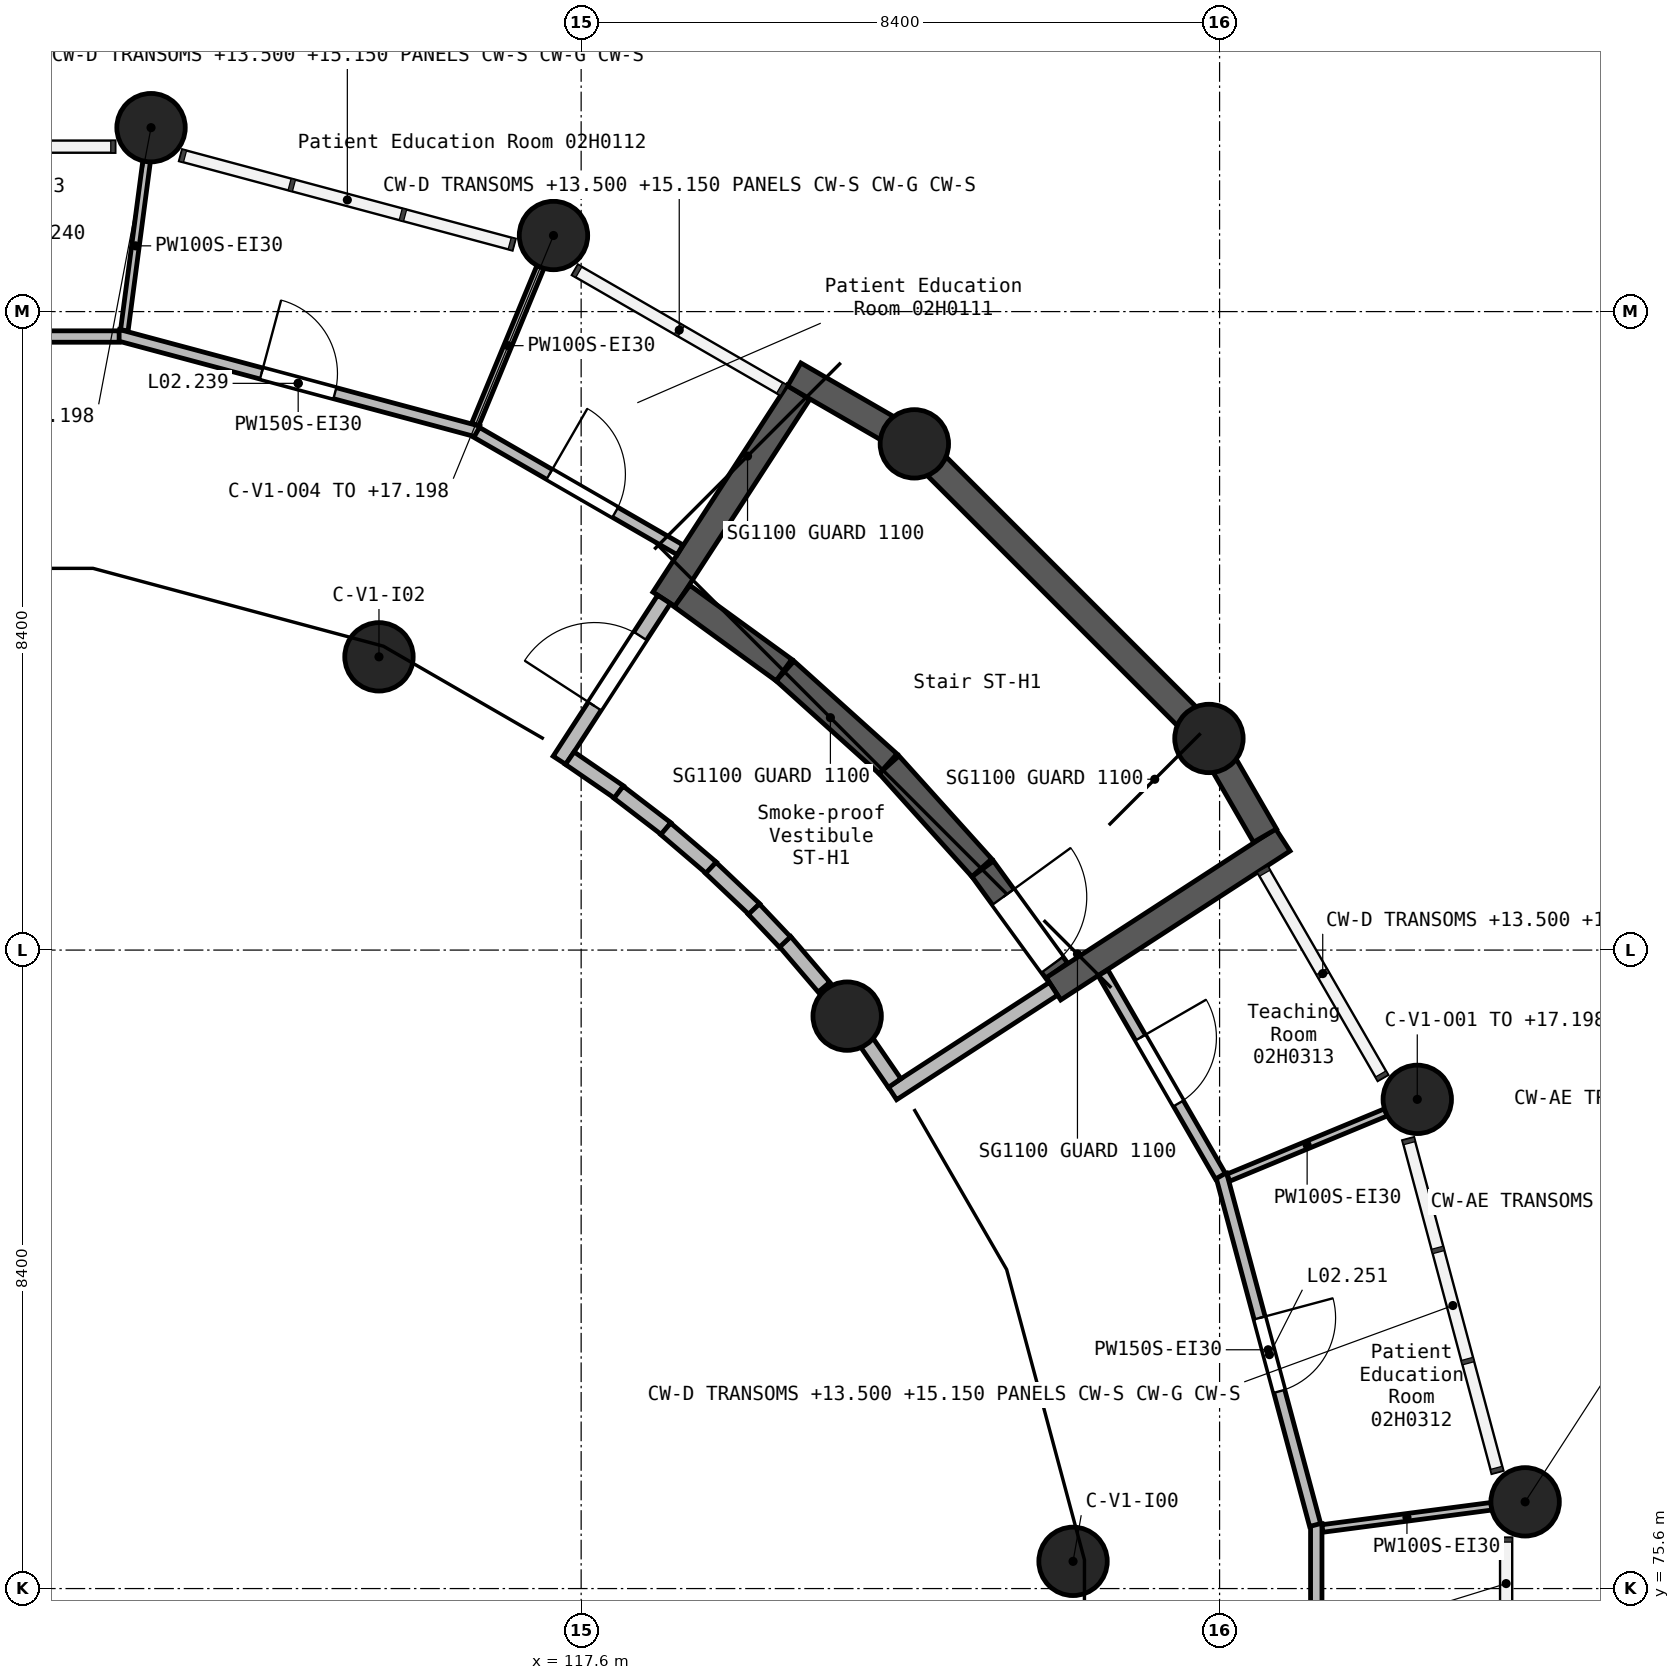
"""IFC4 building model, lengths in metres.
Left out: names, types, materials, properties, quantities, classifications, styles, units other than length and angle.
Written with IfcOpenShell. Run it as: python <this file> out.ifc"""

import sys

from ifc_helpers import new_model, si_unit, direction, frame, frame_2d, origin, origin_2d, place, context, subcontext, project, spatial, rectangle, circle, extrude, element, fill, save


model = new_model("IFC4")
c1 = context("Model", 3, precision=1e-05, world=origin(), true_north=direction((0.0, 1.0)))
c2 = subcontext(c1, "Body", "Model", "MODEL_VIEW")
j1 = project(units=[si_unit("LENGTHUNIT", "METRE"), si_unit("PLANEANGLEUNIT", "RADIAN")], contexts=[c1])
p1 = place(None, origin())
s1 = spatial("IfcSite", under=j1, at=p1, CompositionType="ELEMENT")
p2 = place(p1, origin())
s2 = spatial("IfcBuilding", under=s1, at=p2, CompositionType="ELEMENT")
p3 = place(p2, frame((0.0, 0.0, 12.6)))
s3 = spatial("IfcBuildingStorey", under=s2, at=p3, CompositionType="ELEMENT", Elevation=12.6)
p4 = place(p3, frame((111.941, 94.82, 0.0), z_axis=(0.0, 0.0, 1.0), x_axis=(1.0, 0.0, 0.0)))
e1 = element("IfcColumn", 1, at=p4, inside=s3, PredefinedType="COLUMN", context=c2, shape_type="SweptSolid", body=[
    extrude(circle(Radius=0.45, at=origin_2d()), origin(), (0.0, 0.0, 1.0), 4.598),
])
p5 = place(p3, frame((114.94, 87.858, 0.0), z_axis=(0.0, 0.0, 1.0), x_axis=(1.0, 0.0, 0.0)))
e2 = element("IfcColumn", 2, at=p5, inside=s3, PredefinedType="COLUMN", context=c2, shape_type="SweptSolid", body=[
    extrude(circle(Radius=0.45, at=origin_2d()), origin(), (0.0, 0.0, 1.0), 4.2),
])
p6 = place(p3, frame((117.236, 93.401, 0.0), z_axis=(0.0, 0.0, 1.0), x_axis=(1.0, 0.0, 0.0)))
e3 = element("IfcColumn", 3, at=p6, inside=s3, PredefinedType="COLUMN", context=c2, shape_type="SweptSolid", body=[
    extrude(circle(Radius=0.45, at=origin_2d()), origin(), (0.0, 0.0, 1.0), 4.598),
])
p7 = place(p3, frame((121.1, 83.131, 0.0), z_axis=(0.0, 0.0, 1.0), x_axis=(1.0, 0.0, 0.0)))
e4 = element("IfcColumn", 4, at=p7, inside=s3, PredefinedType="COLUMN", context=c2, shape_type="SweptSolid", body=[
    extrude(circle(Radius=0.45, at=origin_2d()), origin(), (0.0, 0.0, 1.0), 4.2),
])
p8 = place(p3, frame((121.984, 90.66, 0.0), z_axis=(0.0, 0.0, 1.0), x_axis=(1.0, 0.0, 0.0)))
e5 = element("IfcColumn", 5, at=p8, inside=s3, PredefinedType="COLUMN", context=c2, shape_type="SweptSolid", body=[
    extrude(circle(Radius=0.45, at=origin_2d()), origin(), (0.0, 0.0, 1.0), 4.598),
])
p9 = place(p3, frame((124.072, 75.958, 0.0), z_axis=(0.0, 0.0, 1.0), x_axis=(1.0, 0.0, 0.0)))
e6 = element("IfcColumn", 6, at=p9, inside=s3, PredefinedType="COLUMN", context=c2, shape_type="SweptSolid", body=[
    extrude(circle(Radius=0.45, at=origin_2d()), origin(), (0.0, 0.0, 1.0), 4.2),
])
for number, where, z_axis, x_axis in (
    (7, (125.86, 86.784, 0.0), (0.0, 0.0, 1.0), (1.0, 0.0, 0.0)),
    (8, (128.601, 82.036, 0.0), (0.0, 0.0, 1.0), (1.0, 0.0, 0.0)),
    (9, (130.02, 76.741, 0.0), (0.0, 0.0, 1.0), (1.0, 0.0, 0.0)),
):
    element("IfcColumn", number, at=place(p3, frame(where, z_axis=z_axis, x_axis=x_axis)), inside=s3, PredefinedType="COLUMN", context=c2, shape_type="SweptSolid", body=[
        extrude(circle(Radius=0.45, at=origin_2d()), origin(), (0.0, 0.0, 1.0), 4.598),
    ])
p10 = place(p3, frame((118.691, 88.614, 0.0), z_axis=(0.0, 0.0, 1.0), x_axis=(0.544668615038, 0.838651357712, 0.0)))
e10 = element("IfcWall", 10, at=p10, inside=s3, PredefinedType="SHEAR", context=c2, shape_type="SweptSolid", body=[
    extrude(rectangle(XDim=3.248, YDim=0.35, at=frame_2d((1.624, 0.0))), origin(), (0.0, 0.0, 1.0), 4.2),
])
p11 = place(p3, frame((118.927, 88.658, 0.0), z_axis=(0.0, 0.0, 1.0), x_axis=(0.808869786542, -0.587987813155, 0.0)))
e11 = element("IfcWall", 11, at=p11, inside=s3, PredefinedType="SHEAR", context=c2, shape_type="SweptSolid", body=[
    extrude(rectangle(XDim=1.658, YDim=0.35, at=frame_2d((0.829, 0.0))), origin(), (0.0, 0.0, 1.0), 4.2),
])
p12 = place(p3, frame((120.283, 87.672, 0.0), z_axis=(0.0, 0.0, 1.0), x_axis=(0.743081147279, -0.669201321397, 0.0)))
e12 = element("IfcWall", 12, at=p12, inside=s3, PredefinedType="SHEAR", context=c2, shape_type="SweptSolid", body=[
    extrude(rectangle(XDim=1.824, YDim=0.35, at=frame_2d((0.912, 0.0))), origin(), (0.0, 0.0, 1.0), 4.2),
])
p13 = place(p3, frame((120.404, 91.573, 0.0), z_axis=(0.0, 0.0, 1.0), x_axis=(0.866050214951, -0.499957023337, 0.0)))
e13 = element("IfcWall", 13, at=p13, inside=s3, PredefinedType="SHEAR", context=c2, shape_type="SweptSolid", body=[
    extrude(rectangle(XDim=1.802, YDim=0.35, at=frame_2d((0.901, 0.0))), origin(), (0.0, 0.0, 1.0), 4.2),
])
p14 = place(p3, frame((121.651, 86.438, 0.0), z_axis=(0.0, 0.0, 1.0), x_axis=(0.669201321397, -0.743081147279, 0.0)))
e14 = element("IfcWall", 14, at=p14, inside=s3, PredefinedType="SHEAR", context=c2, shape_type="SweptSolid", body=[
    extrude(rectangle(XDim=1.824, YDim=0.35, at=frame_2d((0.912, 0.0))), origin(), (0.0, 0.0, 1.0), 4.2),
])
p15 = place(p3, frame((122.0, 90.644, 0.0), z_axis=(0.0, 0.0, 1.0), x_axis=(0.707106781187, -0.707106781187, 0.0)))
e15 = element("IfcWall", 15, at=p15, inside=s3, PredefinedType="SHEAR", context=c2, shape_type="SweptSolid", body=[
    extrude(rectangle(XDim=5.436, YDim=0.35, at=frame_2d((2.718, 0.0))), origin(), (0.0, 0.0, 1.0), 4.2),
])
p16 = place(p3, frame((122.883, 85.069, 0.0), z_axis=(0.0, 0.0, 1.0), x_axis=(0.587987813155, -0.808869786542, 0.0)))
e16 = element("IfcWall", 16, at=p16, inside=s3, PredefinedType="SHEAR", context=c2, shape_type="SweptSolid", body=[
    extrude(rectangle(XDim=1.658, YDim=0.35, at=frame_2d((0.829, 0.0))), origin(), (0.0, 0.0, 1.0), 4.2),
])
p17 = place(p16, frame((0.458, 0.0, 0.0)))
e17 = element("IfcOpeningElement", 17, at=p17, cuts=e16, PredefinedType="OPENING", context=c2, shape_type="SweptSolid", body=[
    extrude(rectangle(XDim=1.1, YDim=2.1, at=frame_2d((0.55, 1.05))), frame((0.0, 0.185, 0.0), z_axis=(0.0, -1.0, 0.0), x_axis=(1.0, 0.0, 0.0)), (0.0, 0.0, 1.0), 0.37),
])
p18 = place(p3, frame((123.814, 83.491, 0.0), z_axis=(0.0, 0.0, 1.0), x_axis=(0.838691576971, 0.544606682587, 0.0)))
e18 = element("IfcWall", 18, at=p18, inside=s3, PredefinedType="SHEAR", context=c2, shape_type="SweptSolid", body=[
    extrude(rectangle(XDim=3.598, YDim=0.35, at=frame_2d((1.799, 0.0))), origin(), (0.0, 0.0, 1.0), 4.2),
])
p19 = place(p3, frame((125.872, 86.764, 0.0), z_axis=(0.0, 0.0, 1.0), x_axis=(0.499882561262, -0.866093196455, 0.0)))
e19 = element("IfcWall", 19, at=p19, inside=s3, PredefinedType="SHEAR", context=c2, shape_type="SweptSolid", body=[
    extrude(rectangle(XDim=1.452, YDim=0.35, at=frame_2d((0.726, 0.0))), origin(), (0.0, 0.0, 1.0), 4.2),
])
p20 = place(p3, frame((117.315, 86.496, 0.0), z_axis=(0.0, 0.0, 1.0), x_axis=(0.544553338247, 0.838726213853, 0.0)))
e20 = element("IfcWall", 20, at=p20, inside=s3, PredefinedType="SOLIDWALL", context=c2, shape_type="SweptSolid", body=[
    extrude(rectangle(XDim=2.525, YDim=0.2, at=frame_2d((1.263, 0.0))), origin(), (0.0, 0.0, 1.0), 3.85),
])
p21 = place(p20, frame((0.85, 0.0, 0.0)))
e21 = element("IfcOpeningElement", 21, at=p21, cuts=e20, PredefinedType="OPENING", context=c2, shape_type="SweptSolid", body=[
    extrude(rectangle(XDim=1.1, YDim=2.1, at=frame_2d((0.55, 1.05))), frame((0.0, 0.11, 0.0), z_axis=(0.0, -1.0, 0.0), x_axis=(1.0, 0.0, 0.0)), (0.0, 0.0, 1.0), 0.22),
])
p22 = place(p3, frame((121.696, 82.115, 0.0), z_axis=(0.0, 0.0, 1.0), x_axis=(0.838726213853, 0.544553338247, 0.0)))
e22 = element("IfcWall", 22, at=p22, inside=s3, PredefinedType="SOLIDWALL", context=c2, shape_type="SweptSolid", body=[
    extrude(rectangle(XDim=2.525, YDim=0.2, at=frame_2d((1.263, 0.0))), origin(), (0.0, 0.0, 1.0), 3.85),
])
p23 = place(p3, frame((121.335, 82.817, 0.0), z_axis=(0.0, 0.0, 1.0), x_axis=(0.56675458302, -0.823886668557, 0.0)))
e23 = element("IfcWall", 23, at=p23, inside=s3, PredefinedType="SOLIDWALL", context=c2, shape_type="SweptSolid", body=[
    extrude(rectangle(XDim=0.688, YDim=0.2, at=frame_2d((0.344, 0.0))), origin(), (0.0, 0.0, 1.0), 3.85),
])
p24 = place(p3, frame((117.45, 86.525, 0.0), z_axis=(0.0, 0.0, 1.0), x_axis=(0.823906287356, -0.566726062269, 0.0)))
e24 = element("IfcWall", 24, at=p24, inside=s3, PredefinedType="SOLIDWALL", context=c2, shape_type="SweptSolid", body=[
    extrude(rectangle(XDim=0.788, YDim=0.2, at=frame_2d((0.394, 0.0))), origin(), (0.0, 0.0, 1.0), 3.85),
])
for number, where, z_axis, x_axis in (
    (25, (118.092, 86.077, 0.0), (0.0, 0.0, 1.0), (0.793, -0.609, 0.0)),
    (26, (120.282, 84.113, 0.0), (0.0, 0.0, 1.0), (0.65, -0.76, 0.0)),
):
    element("IfcWall", number, at=place(p3, frame(where, z_axis=z_axis, x_axis=x_axis)), inside=s3, PredefinedType="SOLIDWALL", context=c2, shape_type="SweptSolid", body=[
        extrude(rectangle(XDim=0.79, YDim=0.2, at=frame_2d((0.395, 0.0))), origin(), (0.0, 0.0, 1.0), 3.85),
    ])
p25 = place(p3, frame((118.712, 85.595, 0.0), z_axis=(0.0, 0.0, 1.0), x_axis=(0.760389572583, -0.649467241597, 0.0)))
e27 = element("IfcWall", 27, at=p25, inside=s3, PredefinedType="SOLIDWALL", context=c2, shape_type="SweptSolid", body=[
    extrude(rectangle(XDim=0.79, YDim=0.2, at=frame_2d((0.395, 0.0))), origin(), (0.0, 0.0, 1.0), 3.85),
])
p26 = place(p3, frame((119.306, 85.082, 0.0), z_axis=(0.0, 0.0, 1.0), x_axis=(0.726001390363, -0.687693231893, 0.0)))
e28 = element("IfcWall", 28, at=p26, inside=s3, PredefinedType="SOLIDWALL", context=c2, shape_type="SweptSolid", body=[
    extrude(rectangle(XDim=0.79, YDim=0.2, at=frame_2d((0.395, 0.0))), origin(), (0.0, 0.0, 1.0), 3.85),
])
p27 = place(p3, frame((119.872, 84.538, 0.0), z_axis=(0.0, 0.0, 1.0), x_axis=(0.687562563481, -0.726125141624, 0.0)))
e29 = element("IfcWall", 29, at=p27, inside=s3, PredefinedType="SOLIDWALL", context=c2, shape_type="SweptSolid", body=[
    extrude(rectangle(XDim=0.595, YDim=0.2, at=frame_2d((0.298, 0.0))), origin(), (0.0, 0.0, 1.0), 3.85),
])
p28 = place(p3, frame((127.272, 71.545, 0.0), z_axis=(0.0, 0.0, 1.0), x_axis=(0.0, 1.0, 0.0)))
e30 = element("IfcWall", 30, at=p28, inside=s3, PredefinedType="PARTITIONING", context=c2, shape_type="SweptSolid", body=[
    extrude(rectangle(XDim=4.91, YDim=0.15, at=frame_2d((2.455, 0.0))), origin(), (0.0, 0.0, 1.0), 3.85),
])
p29 = place(p28, frame((1.955, 0.0, 0.0)))
e31 = element("IfcOpeningElement", 31, at=p29, cuts=e30, PredefinedType="OPENING", context=c2, shape_type="SweptSolid", body=[
    extrude(rectangle(XDim=1.0, YDim=2.1, at=frame_2d((0.5, 1.05))), frame((0.0, 0.085, 0.0), z_axis=(0.0, -1.0, 0.0), x_axis=(1.0, 0.0, 0.0)), (0.0, 0.0, 1.0), 0.17),
])
p30 = place(p3, frame((111.507, 92.091, 0.0), z_axis=(0.0, 0.0, 1.0), x_axis=(0.965901416029, -0.258910128254, 0.0)))
e32 = element("IfcWall", 32, at=p30, inside=s3, PredefinedType="PARTITIONING", context=c2, shape_type="SweptSolid", body=[
    extrude(rectangle(XDim=4.908, YDim=0.15, at=frame_2d((2.454, 0.0))), origin(), (0.0, 0.0, 1.0), 3.85),
])
p31 = place(p30, frame((1.954, 0.0, 0.0)))
e33 = element("IfcOpeningElement", 33, at=p31, cuts=e32, PredefinedType="OPENING", context=c2, shape_type="SweptSolid", body=[
    extrude(rectangle(XDim=1.0, YDim=2.1, at=frame_2d((0.5, 1.05))), frame((0.0, 0.085, 0.0), z_axis=(0.0, -1.0, 0.0), x_axis=(1.0, 0.0, 0.0)), (0.0, 0.0, 1.0), 0.17),
])
p32 = place(p3, frame((106.879, 92.072, 0.0), z_axis=(0.0, 0.0, 1.0), x_axis=(1.0, 0.0, 0.0)))
e34 = element("IfcWall", 34, at=p32, inside=s3, PredefinedType="PARTITIONING", context=c2, shape_type="SweptSolid", body=[
    extrude(rectangle(XDim=4.642, YDim=0.15, at=frame_2d((2.321, 0.0))), origin(), (0.0, 0.0, 1.0), 3.85),
])
p33 = place(p32, frame((1.821, 0.0, 0.0)))
e35 = element("IfcOpeningElement", 35, at=p33, cuts=e34, PredefinedType="OPENING", context=c2, shape_type="SweptSolid", body=[
    extrude(rectangle(XDim=1.0, YDim=2.1, at=frame_2d((0.5, 1.05))), frame((0.0, 0.085, 0.0), z_axis=(0.0, -1.0, 0.0), x_axis=(1.0, 0.0, 0.0)), (0.0, 0.0, 1.0), 0.17),
])
p34 = place(p3, frame((126.021, 81.047, 0.0), z_axis=(0.0, 0.0, 1.0), x_axis=(0.259008724248, -0.965874981953, 0.0)))
e36 = element("IfcWall", 36, at=p34, inside=s3, PredefinedType="PARTITIONING", context=c2, shape_type="SweptSolid", body=[
    extrude(rectangle(XDim=4.774, YDim=0.15, at=frame_2d((2.387, 0.0))), origin(), (0.0, 0.0, 1.0), 3.85),
])
p35 = place(p34, frame((1.954, 0.0, 0.0)))
e37 = element("IfcOpeningElement", 37, at=p35, cuts=e36, PredefinedType="OPENING", context=c2, shape_type="SweptSolid", body=[
    extrude(rectangle(XDim=1.0, YDim=2.1, at=frame_2d((0.5, 1.05))), frame((0.0, 0.085, 0.0), z_axis=(0.0, -1.0, 0.0), x_axis=(1.0, 0.0, 0.0)), (0.0, 0.0, 1.0), 0.17),
])
p36 = place(p3, frame((124.467, 83.701, 0.0), z_axis=(0.0, 0.0, 1.0), x_axis=(0.499895749011, -0.866085584755, 0.0)))
e38 = element("IfcWall", 38, at=p36, inside=s3, PredefinedType="PARTITIONING", context=c2, shape_type="SweptSolid", body=[
    extrude(rectangle(XDim=3.09, YDim=0.15, at=frame_2d((1.545, 0.0))), origin(), (0.0, 0.0, 1.0), 3.85),
])
p37 = place(p36, frame((0.984, 0.0, 0.0)))
e39 = element("IfcOpeningElement", 39, at=p37, cuts=e38, PredefinedType="OPENING", context=c2, shape_type="SweptSolid", body=[
    extrude(rectangle(XDim=1.0, YDim=2.1, at=frame_2d((0.5, 1.05))), frame((0.0, 0.085, 0.0), z_axis=(0.0, -1.0, 0.0), x_axis=(1.0, 0.0, 0.0)), (0.0, 0.0, 1.0), 0.17),
])
p38 = place(p3, frame((116.225, 90.811, 0.0), z_axis=(0.0, 0.0, 1.0), x_axis=(0.866085584755, -0.499895749011, 0.0)))
e40 = element("IfcWall", 40, at=p38, inside=s3, PredefinedType="PARTITIONING", context=c2, shape_type="SweptSolid", body=[
    extrude(rectangle(XDim=3.09, YDim=0.15, at=frame_2d((1.545, 0.0))), origin(), (0.0, 0.0, 1.0), 3.85),
])
p39 = place(p38, frame((1.105, 0.0, 0.0)))
e41 = element("IfcOpeningElement", 41, at=p39, cuts=e40, PredefinedType="OPENING", context=c2, shape_type="SweptSolid", body=[
    extrude(rectangle(XDim=1.0, YDim=2.1, at=frame_2d((0.5, 1.05))), frame((0.0, 0.085, 0.0), z_axis=(0.0, -1.0, 0.0), x_axis=(1.0, 0.0, 0.0)), (0.0, 0.0, 1.0), 0.17),
])
p40 = place(p3, frame((116.206, 90.916, 0.0), z_axis=(0.0, 0.0, 1.0), x_axis=(0.382829249812, 0.923819119465, 0.0)))
e42 = element("IfcWall", 42, at=p40, inside=s3, PredefinedType="PARTITIONING", context=c2, shape_type="SweptSolid", body=[
    extrude(rectangle(XDim=2.243, YDim=0.1, at=frame_2d((1.122, 0.0))), origin(), (0.0, 0.0, 1.0), 3.85),
])
p41 = place(p3, frame((126.116, 81.006, 0.0), z_axis=(0.0, 0.0, 1.0), x_axis=(0.923835070081, 0.382790756536, 0.0)))
e43 = element("IfcWall", 43, at=p41, inside=s3, PredefinedType="PARTITIONING", context=c2, shape_type="SweptSolid", body=[
    extrude(rectangle(XDim=2.243, YDim=0.1, at=frame_2d((1.122, 0.0))), origin(), (0.0, 0.0, 1.0), 3.85),
])
p42 = place(p3, frame((111.59, 92.153, 0.0), z_axis=(0.0, 0.0, 1.0), x_axis=(0.13062345865, 0.991432051151, 0.0)))
e44 = element("IfcWall", 44, at=p42, inside=s3, PredefinedType="PARTITIONING", context=c2, shape_type="SweptSolid", body=[
    extrude(rectangle(XDim=2.243, YDim=0.1, at=frame_2d((1.122, 0.0))), origin(), (0.0, 0.0, 1.0), 3.85),
])
p43 = place(p3, frame((127.354, 76.391, 0.0), z_axis=(0.0, 0.0, 1.0), x_axis=(0.991472443169, 0.130316516358, 0.0)))
e45 = element("IfcWall", 45, at=p43, inside=s3, PredefinedType="PARTITIONING", context=c2, shape_type="SweptSolid", body=[
    extrude(rectangle(XDim=2.242, YDim=0.1, at=frame_2d((1.121, 0.0))), origin(), (0.0, 0.0, 1.0), 3.85),
])
p44 = place(p39, origin())
e46 = element("IfcDoor", 46, at=p44, inside=s3, OperationType="SINGLE_SWING_RIGHT", PredefinedType="DOOR", context=c2, shape_type="SweptSolid", body=[
    extrude(rectangle(XDim=1.0, YDim=2.1, at=frame_2d((0.5, 1.05))), frame((0.0, 0.025, 0.0), z_axis=(0.0, -1.0, 0.0), x_axis=(1.0, 0.0, 0.0)), (0.0, 0.0, 1.0), 0.05),
])
fill(e41, e46)
p45 = place(p31, origin())
e47 = element("IfcDoor", 47, at=p45, inside=s3, OperationType="SINGLE_SWING_LEFT", PredefinedType="DOOR", context=c2, shape_type="SweptSolid", body=[
    extrude(rectangle(XDim=1.0, YDim=2.1, at=frame_2d((0.5, 1.05))), frame((0.0, 0.025, 0.0), z_axis=(0.0, -1.0, 0.0), x_axis=(1.0, 0.0, 0.0)), (0.0, 0.0, 1.0), 0.05),
])
fill(e33, e47)
p46 = place(p35, origin())
e48 = element("IfcDoor", 48, at=p46, inside=s3, OperationType="SINGLE_SWING_RIGHT", PredefinedType="DOOR", context=c2, shape_type="SweptSolid", body=[
    extrude(rectangle(XDim=1.0, YDim=2.1, at=frame_2d((0.5, 1.05))), frame((0.0, 0.025, 0.0), z_axis=(0.0, -1.0, 0.0), x_axis=(1.0, 0.0, 0.0)), (0.0, 0.0, 1.0), 0.05),
])
fill(e37, e48)
p47 = place(p37, origin())
e49 = element("IfcDoor", 49, at=p47, inside=s3, OperationType="SINGLE_SWING_LEFT", PredefinedType="DOOR", context=c2, shape_type="SweptSolid", body=[
    extrude(rectangle(XDim=1.0, YDim=2.1, at=frame_2d((0.5, 1.05))), frame((0.0, 0.025, 0.0), z_axis=(0.0, -1.0, 0.0), x_axis=(1.0, 0.0, 0.0)), (0.0, 0.0, 1.0), 0.05),
])
fill(e39, e49)
p48 = place(p17, origin())
e50 = element("IfcDoor", 50, at=p48, inside=s3, OperationType="SINGLE_SWING_RIGHT", PredefinedType="DOOR", context=c2, shape_type="SweptSolid", body=[
    extrude(rectangle(XDim=1.1, YDim=2.1, at=frame_2d((0.55, 1.05))), frame((0.0, 0.025, 0.0), z_axis=(0.0, -1.0, 0.0), x_axis=(1.0, 0.0, 0.0)), (0.0, 0.0, 1.0), 0.05),
])
fill(e17, e50)
p49 = place(p21, frame((1.1, 0.0, 0.0), z_axis=(0.0, 0.0, 1.0), x_axis=(-1.0, 0.0, 0.0)))
e51 = element("IfcDoor", 51, at=p49, inside=s3, OperationType="SINGLE_SWING_LEFT", PredefinedType="DOOR", context=c2, shape_type="SweptSolid", body=[
    extrude(rectangle(XDim=1.1, YDim=2.1, at=frame_2d((0.55, 1.05))), frame((0.0, 0.025, 0.0), z_axis=(0.0, -1.0, 0.0), x_axis=(1.0, 0.0, 0.0)), (0.0, 0.0, 1.0), 0.05),
])
fill(e21, e51)
save(model, sys.argv[1])
